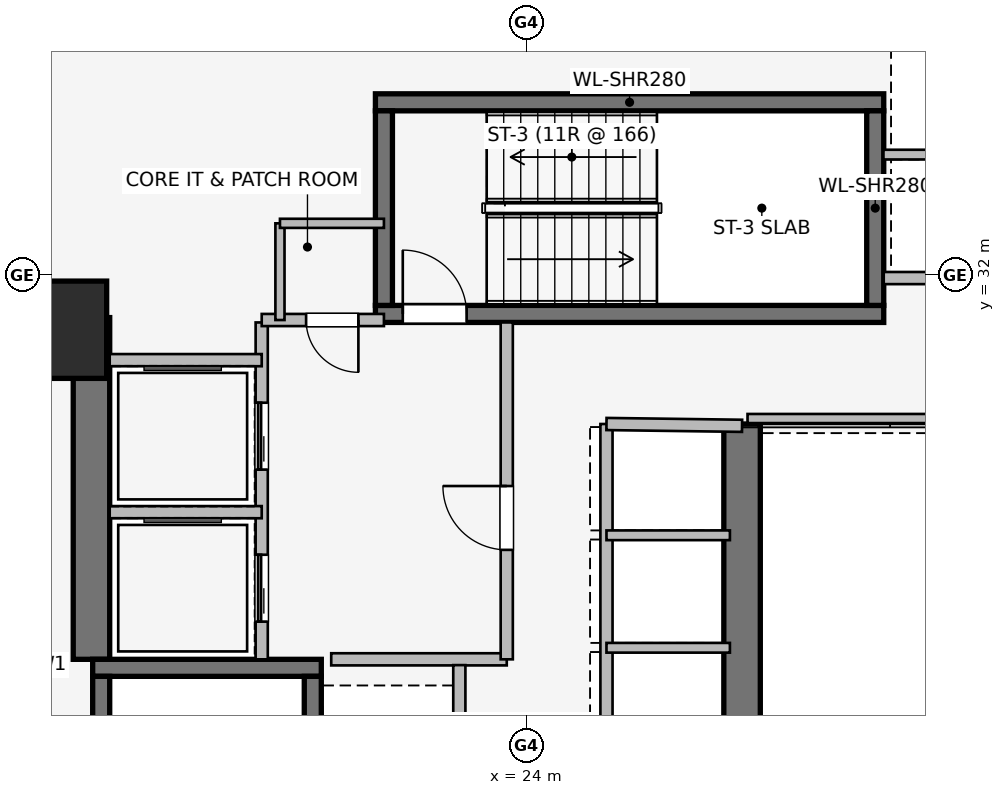
"""IFC4 building model, lengths in metres.
Left out: names, types, materials, properties, quantities, classifications, styles, units other than length and angle.
Written with IfcOpenShell. Run it as: python <this file> out.ifc"""

import sys

from ifc_helpers import new_model, si_unit, direction, frame, frame_2d, origin, origin_2d, place, context, subcontext, project, spatial, rectangle, extrude, element, fill, save


model = new_model("IFC4")
c1 = context("Model", 3, precision=1e-05, world=origin(), true_north=direction((0.0, 1.0)))
c2 = subcontext(c1, "Body", "Model", "MODEL_VIEW")
j1 = project(units=[si_unit("LENGTHUNIT", "METRE"), si_unit("PLANEANGLEUNIT", "RADIAN")], contexts=[c1])
p1 = place(None, origin())
s1 = spatial("IfcSite", under=j1, at=p1, CompositionType="ELEMENT")
p2 = place(p1, origin())
s2 = spatial("IfcBuilding", under=s1, at=p2, CompositionType="ELEMENT")
p3 = place(p2, frame((0.0, 0.0, 48.9)))
s3 = spatial("IfcBuildingStorey", under=s2, at=p3, CompositionType="ELEMENT", Elevation=48.9)
p4 = place(p3, frame((16.85, 25.68, 0.0), z_axis=(0.0, 0.0, 1.0), x_axis=(0.0, 1.0, 0.0)))
e1 = element("IfcWall", 1, at=p4, inside=s3, PredefinedType="SHEAR", context=c2, shape_type="SweptSolid", body=[
    extrude(rectangle(XDim=5.62, YDim=0.6, at=frame_2d((2.81, 0.0))), origin(), (0.0, 0.0, 1.0), 3.65),
])
p5 = place(p3, frame((27.55, 29.55, 0.0), z_axis=(0.0, 0.0, 1.0), x_axis=(0.0, -1.0, 0.0)))
e2 = element("IfcWall", 2, at=p5, inside=s3, PredefinedType="SHEAR", context=c2, shape_type="SweptSolid", body=[
    extrude(rectangle(XDim=11.25, YDim=0.6, at=frame_2d((5.625, 0.0))), origin(), (0.0, 0.0, 1.0), 3.65),
])
p6 = place(p3, frame((20.63, 25.54, 0.0), z_axis=(0.0, 0.0, 1.0), x_axis=(-1.0, 0.0, 0.0)))
e3 = element("IfcWall", 3, at=p6, inside=s3, PredefinedType="SHEAR", context=c2, shape_type="SweptSolid", body=[
    extrude(rectangle(XDim=3.76, YDim=0.28, at=frame_2d((1.88, 0.0))), origin(), (0.0, 0.0, 1.0), 3.65),
])
p7 = place(p3, frame((17.01, 25.4, 0.0), z_axis=(0.0, 0.0, 1.0), x_axis=(0.0, -1.0, 0.0)))
e4 = element("IfcWall", 4, at=p7, inside=s3, PredefinedType="SHEAR", context=c2, shape_type="SweptSolid", body=[
    extrude(rectangle(XDim=7.8, YDim=0.28, at=frame_2d((3.9, 0.0))), origin(), (0.0, 0.0, 1.0), 3.65),
])
p8 = place(p3, frame((20.49, 17.6, 0.0), z_axis=(0.0, 0.0, 1.0), x_axis=(0.0, 1.0, 0.0)))
e5 = element("IfcWall", 5, at=p8, inside=s3, PredefinedType="SHEAR", context=c2, shape_type="SweptSolid", body=[
    extrude(rectangle(XDim=7.8, YDim=0.28, at=frame_2d((3.9, 0.0))), origin(), (0.0, 0.0, 1.0), 3.65),
])
p9 = place(p8, frame((0.44, 0.0, 0.0)))
e6 = element("IfcOpeningElement", 6, at=p9, cuts=e5, PredefinedType="OPENING", context=c2, shape_type="SweptSolid", body=[
    extrude(rectangle(XDim=1.05, YDim=2.0, at=frame_2d((0.525, 1.0))), frame((0.0, 0.15, 0.0), z_axis=(0.0, -1.0, 0.0), x_axis=(1.0, 0.0, 0.0)), (0.0, 0.0, 1.0), 0.3),
])
p10 = place(p3, frame((21.52, 31.36, 0.0), z_axis=(0.0, 0.0, 1.0), x_axis=(1.0, 0.0, 0.0)))
e7 = element("IfcWall", 7, at=p10, inside=s3, PredefinedType="SHEAR", context=c2, shape_type="SweptSolid", body=[
    extrude(rectangle(XDim=8.36, YDim=0.28, at=frame_2d((4.18, 0.0))), origin(), (0.0, 0.0, 1.0), 3.65),
])
p11 = place(p10, frame((0.45, 0.0, 0.0)))
e8 = element("IfcOpeningElement", 8, at=p11, cuts=e7, PredefinedType="OPENING", context=c2, shape_type="SweptSolid", body=[
    extrude(rectangle(XDim=1.05, YDim=2.0, at=frame_2d((0.525, 1.0))), frame((0.0, 0.15, 0.0), z_axis=(0.0, -1.0, 0.0), x_axis=(1.0, 0.0, 0.0)), (0.0, 0.0, 1.0), 0.3),
])
p12 = place(p3, frame((29.88, 34.84, 0.0), z_axis=(0.0, 0.0, 1.0), x_axis=(-1.0, 0.0, 0.0)))
e9 = element("IfcWall", 9, at=p12, inside=s3, PredefinedType="SHEAR", context=c2, shape_type="SweptSolid", body=[
    extrude(rectangle(XDim=8.36, YDim=0.28, at=frame_2d((4.18, 0.0))), origin(), (0.0, 0.0, 1.0), 3.65),
])
for number, where, z_axis, x_axis in (
    (10, (21.66, 34.7, 0.0), (0.0, 0.0, 1.0), (0.0, -1.0, 0.0)),
    (11, (29.74, 31.5, 0.0), (0.0, 0.0, 1.0), (0.0, 1.0, 0.0)),
):
    element("IfcWall", number, at=place(p3, frame(where, z_axis=z_axis, x_axis=x_axis)), inside=s3, PredefinedType="SHEAR", context=c2, shape_type="SweptSolid", body=[
        extrude(rectangle(XDim=3.2, YDim=0.28, at=frame_2d((1.6, 0.0))), origin(), (0.0, 0.0, 1.0), 3.65),
    ])
p13 = place(p3, frame((16.3, 31.1, 0.0), z_axis=(0.0, 0.0, 1.0), x_axis=(1.0, 0.0, 0.0)))
e12 = element("IfcColumn", 12, at=p13, inside=s3, PredefinedType="COLUMN", context=c2, shape_type="SweptSolid", body=[
    extrude(rectangle(XDim=1.6, YDim=1.6, at=origin_2d()), origin(), (0.0, 0.0, 1.0), 3.65),
])
p14 = place(p3, frame((19.65, 25.68, 0.0), z_axis=(0.0, 0.0, 1.0), x_axis=(0.0, 1.0, 0.0)))
e13 = element("IfcWall", 13, at=p14, inside=s3, PredefinedType="PARTITIONING", context=c2, shape_type="SweptSolid", body=[
    extrude(rectangle(XDim=5.54, YDim=0.2, at=frame_2d((2.77, 0.0))), origin(), (0.0, 0.0, 1.0), 3.36),
])
p15 = place(p14, frame((0.62, 0.0, 0.0)))
e14 = element("IfcOpeningElement", 14, at=p15, cuts=e13, PredefinedType="OPENING", context=c2, shape_type="SweptSolid", body=[
    extrude(rectangle(XDim=1.1, YDim=2.2, at=frame_2d((0.55, 1.1))), frame((0.0, 0.11, 0.0), z_axis=(0.0, -1.0, 0.0), x_axis=(1.0, 0.0, 0.0)), (0.0, 0.0, 1.0), 0.22),
])
p16 = place(p14, frame((3.12, 0.0, 0.0)))
e15 = element("IfcOpeningElement", 15, at=p16, cuts=e13, PredefinedType="OPENING", context=c2, shape_type="SweptSolid", body=[
    extrude(rectangle(XDim=1.1, YDim=2.2, at=frame_2d((0.55, 1.1))), frame((0.0, 0.11, 0.0), z_axis=(0.0, -1.0, 0.0), x_axis=(1.0, 0.0, 0.0)), (0.0, 0.0, 1.0), 0.22),
])
p17 = place(p3, frame((20.793, 25.68, 0.0), z_axis=(0.0, 0.0, 1.0), x_axis=(1.0, 0.0, 0.0)))
e16 = element("IfcWall", 16, at=p17, inside=s3, PredefinedType="PARTITIONING", context=c2, shape_type="SweptSolid", body=[
    extrude(rectangle(XDim=2.887, YDim=0.2, at=frame_2d((1.443, 0.0))), origin(), (0.0, 0.0, 1.0), 3.36),
])
p18 = place(p3, frame((23.68, 25.68, 0.0), z_axis=(0.0, 0.0, 1.0), x_axis=(0.0, 1.0, 0.0)))
e17 = element("IfcWall", 17, at=p18, inside=s3, PredefinedType="PARTITIONING", context=c2, shape_type="SweptSolid", body=[
    extrude(rectangle(XDim=5.54, YDim=0.2, at=frame_2d((2.77, 0.0))), origin(), (0.0, 0.0, 1.0), 3.36),
])
p19 = place(p18, frame((1.8, 0.0, 0.0)))
e18 = element("IfcOpeningElement", 18, at=p19, cuts=e17, PredefinedType="OPENING", context=c2, shape_type="SweptSolid", body=[
    extrude(rectangle(XDim=1.05, YDim=2.0, at=frame_2d((0.525, 1.0))), frame((0.0, 0.11, 0.0), z_axis=(0.0, -1.0, 0.0), x_axis=(1.0, 0.0, 0.0)), (0.0, 0.0, 1.0), 0.22),
])
p20 = place(p3, frame((21.66, 31.26, 0.0), z_axis=(0.0, 0.0, 1.0), x_axis=(-1.0, 0.0, 0.0)))
e19 = element("IfcWall", 19, at=p20, inside=s3, PredefinedType="PARTITIONING", context=c2, shape_type="SweptSolid", body=[
    extrude(rectangle(XDim=2.01, YDim=0.2, at=frame_2d((1.005, 0.0))), origin(), (0.0, 0.0, 1.0), 3.36),
])
p21 = place(p20, frame((0.42, 0.0, 0.0)))
e20 = element("IfcOpeningElement", 20, at=p21, cuts=e19, PredefinedType="OPENING", context=c2, shape_type="SweptSolid", body=[
    extrude(rectangle(XDim=0.86, YDim=2.0, at=frame_2d((0.43, 1.0))), frame((0.0, 0.11, 0.0), z_axis=(0.0, -1.0, 0.0), x_axis=(1.0, 0.0, 0.0)), (0.0, 0.0, 1.0), 0.22),
])
p22 = place(p3, frame((17.15, 28.1, 0.0), z_axis=(0.0, 0.0, 1.0), x_axis=(1.0, 0.0, 0.0)))
e21 = element("IfcWall", 21, at=p22, inside=s3, PredefinedType="PARTITIONING", context=c2, shape_type="SweptSolid", body=[
    extrude(rectangle(XDim=2.5, YDim=0.2, at=frame_2d((1.25, 0.0))), origin(), (0.0, 0.0, 1.0), 3.36),
])
p23 = place(p3, frame((19.65, 30.6, 0.0), z_axis=(0.0, 0.0, 1.0), x_axis=(-1.0, 0.0, 0.0)))
e22 = element("IfcWall", 22, at=p23, inside=s3, PredefinedType="PARTITIONING", context=c2, shape_type="SweptSolid", body=[
    extrude(rectangle(XDim=2.5, YDim=0.2, at=frame_2d((1.25, 0.0))), origin(), (0.0, 0.0, 1.0), 2.26),
])
p24 = place(p3, frame((32.48, 31.95, 0.0), z_axis=(0.0, 0.0, 1.0), x_axis=(-1.0, 0.0, 0.0)))
e23 = element("IfcWall", 23, at=p24, inside=s3, PredefinedType="PARTITIONING", context=c2, shape_type="SweptSolid", body=[
    extrude(rectangle(XDim=2.6, YDim=0.2, at=frame_2d((1.3, 0.0))), origin(), (0.0, 0.0, 1.0), 3.36),
])
p25 = place(p3, frame((29.875, 33.98, 0.0), z_axis=(0.0, 0.0, 1.0), x_axis=(1.0, 0.0, 0.0)))
e24 = element("IfcWall", 24, at=p25, inside=s3, PredefinedType="PARTITIONING", context=c2, shape_type="SweptSolid", body=[
    extrude(rectangle(XDim=2.605, YDim=0.16, at=frame_2d((1.302, 0.0))), origin(), (0.0, 0.0, 1.0), 3.36),
])
p26 = place(p3, frame((22.9, 19.5, 0.0), z_axis=(0.0, 0.0, 1.0), x_axis=(0.0, 1.0, 0.0)))
e25 = element("IfcWall", 25, at=p26, inside=s3, PredefinedType="PARTITIONING", context=c2, shape_type="SweptSolid", body=[
    extrude(rectangle(XDim=6.085, YDim=0.2, at=frame_2d((3.042, 0.0))), origin(), (0.0, 0.0, 1.0), 3.36),
])
p27 = place(p3, frame((25.32, 29.55, 0.0), z_axis=(0.0, 0.0, 1.0), x_axis=(0.0, -1.0, 0.0)))
e26 = element("IfcWall", 26, at=p27, inside=s3, PredefinedType="PARTITIONING", context=c2, shape_type="SweptSolid", body=[
    extrude(rectangle(XDim=11.19, YDim=0.2, at=frame_2d((5.595, 0.0))), origin(), (0.0, 0.0, 1.0), 3.36),
])
p28 = place(p27, frame((6.22, 0.0, 0.0)))
e27 = element("IfcOpeningElement", 27, at=p28, cuts=e26, PredefinedType="OPENING", context=c2, shape_type="SweptSolid", body=[
    extrude(rectangle(XDim=1.1, YDim=2.2, at=frame_2d((0.55, 1.1))), frame((0.0, 0.11, 0.0), z_axis=(0.0, -1.0, 0.0), x_axis=(1.0, 0.0, 0.0)), (0.0, 0.0, 1.0), 0.22),
])
p29 = place(p27, frame((8.07, 0.0, 0.0)))
e28 = element("IfcOpeningElement", 28, at=p29, cuts=e26, PredefinedType="OPENING", context=c2, shape_type="SweptSolid", body=[
    extrude(rectangle(XDim=1.1, YDim=2.2, at=frame_2d((0.55, 1.1))), frame((0.0, 0.11, 0.0), z_axis=(0.0, -1.0, 0.0), x_axis=(1.0, 0.0, 0.0)), (0.0, 0.0, 1.0), 0.22),
])
p30 = place(p27, frame((9.73, 0.0, 0.0)))
e29 = element("IfcOpeningElement", 29, at=p30, cuts=e26, PredefinedType="OPENING", context=c2, shape_type="SweptSolid", body=[
    extrude(rectangle(XDim=1.1, YDim=2.2, at=frame_2d((0.55, 1.1))), frame((0.0, 0.11, 0.0), z_axis=(0.0, -1.0, 0.0), x_axis=(1.0, 0.0, 0.0)), (0.0, 0.0, 1.0), 0.22),
])
p31 = place(p3, frame((27.55, 29.52, 0.0), z_axis=(0.0, 0.0, 1.0), x_axis=(-0.999909343457, 0.013464949556, 0.0)))
e30 = element("IfcWall", 30, at=p31, inside=s3, PredefinedType="PARTITIONING", context=c2, shape_type="SweptSolid", body=[
    extrude(rectangle(XDim=2.23, YDim=0.2, at=frame_2d((1.115, 0.0))), origin(), (0.0, 0.0, 1.0), 2.26),
])
for number, where, z_axis, x_axis in (
    (31, (25.32, 25.87, 0.0), (0.0, 0.0, 1.0), (1.0, 0.0, 0.0)),
    (32, (25.32, 27.72, 0.0), (0.0, 0.0, 1.0), (1.0, 0.0, 0.0)),
):
    element("IfcWall", number, at=place(p3, frame(where, z_axis=z_axis, x_axis=x_axis)), inside=s3, PredefinedType="PARTITIONING", context=c2, shape_type="SweptSolid", body=[
        extrude(rectangle(XDim=2.03, YDim=0.16, at=frame_2d((1.015, 0.0))), origin(), (0.0, 0.0, 1.0), 3.36),
    ])
p32 = place(p3, frame((19.95, 32.85, 0.0), z_axis=(0.0, 0.0, 1.0), x_axis=(0.0, -1.0, 0.0)))
e33 = element("IfcWall", 33, at=p32, inside=s3, PredefinedType="PARTITIONING", context=c2, shape_type="SweptSolid", body=[
    extrude(rectangle(XDim=1.59, YDim=0.15, at=frame_2d((0.795, 0.0))), origin(), (0.0, 0.0, 1.0), 3.36),
])
p33 = place(p3, frame((21.66, 32.85, 0.0), z_axis=(0.0, 0.0, 1.0), x_axis=(-1.0, 0.0, 0.0)))
e34 = element("IfcWall", 34, at=p33, inside=s3, PredefinedType="PARTITIONING", context=c2, shape_type="SweptSolid", body=[
    extrude(rectangle(XDim=1.71, YDim=0.15, at=frame_2d((0.855, 0.0))), origin(), (0.0, 0.0, 1.0), 3.36),
])
p34 = place(p3, frame((39.84, 29.64, 0.0), z_axis=(0.0, 0.0, 1.0), x_axis=(-1.0, 0.0, 0.0)))
e35 = element("IfcWall", 35, at=p34, inside=s3, PredefinedType="PARTITIONING", context=c2, shape_type="SweptSolid", body=[
    extrude(rectangle(XDim=12.2, YDim=0.15, at=frame_2d((6.1, 0.0))), origin(), (0.0, 0.0, 1.0), 2.501),
])
p35 = place(p11, origin())
e36 = element("IfcDoor", 36, at=p35, inside=s3, OperationType="SINGLE_SWING_LEFT", PredefinedType="DOOR", context=c2, shape_type="SweptSolid", body=[
    extrude(rectangle(XDim=1.05, YDim=2.0, at=frame_2d((0.525, 1.0))), frame((0.0, 0.025, 0.0), z_axis=(0.0, -1.0, 0.0), x_axis=(1.0, 0.0, 0.0)), (0.0, 0.0, 1.0), 0.05),
])
fill(e8, e36)
p36 = place(p15, origin())
e37 = element("IfcDoor", 37, at=p36, inside=s3, OperationType="SLIDING_TO_LEFT", PredefinedType="DOOR", context=c2, shape_type="SweptSolid", body=[
    extrude(rectangle(XDim=1.1, YDim=2.2, at=frame_2d((0.55, 1.1))), frame((0.0, 0.025, 0.0), z_axis=(0.0, -1.0, 0.0), x_axis=(1.0, 0.0, 0.0)), (0.0, 0.0, 1.0), 0.05),
])
fill(e14, e37)
p37 = place(p16, origin())
e38 = element("IfcDoor", 38, at=p37, inside=s3, OperationType="SLIDING_TO_LEFT", PredefinedType="DOOR", context=c2, shape_type="SweptSolid", body=[
    extrude(rectangle(XDim=1.1, YDim=2.2, at=frame_2d((0.55, 1.1))), frame((0.0, 0.025, 0.0), z_axis=(0.0, -1.0, 0.0), x_axis=(1.0, 0.0, 0.0)), (0.0, 0.0, 1.0), 0.05),
])
fill(e15, e38)
p38 = place(p19, origin())
e39 = element("IfcDoor", 39, at=p38, inside=s3, OperationType="SINGLE_SWING_RIGHT", PredefinedType="DOOR", context=c2, shape_type="SweptSolid", body=[
    extrude(rectangle(XDim=1.05, YDim=2.0, at=frame_2d((0.525, 1.0))), frame((0.0, 0.025, 0.0), z_axis=(0.0, -1.0, 0.0), x_axis=(1.0, 0.0, 0.0)), (0.0, 0.0, 1.0), 0.05),
])
fill(e18, e39)
p39 = place(p21, origin())
e40 = element("IfcDoor", 40, at=p39, inside=s3, OperationType="SINGLE_SWING_LEFT", PredefinedType="DOOR", context=c2, shape_type="SweptSolid", body=[
    extrude(rectangle(XDim=0.86, YDim=2.0, at=frame_2d((0.43, 1.0))), frame((0.0, 0.025, 0.0), z_axis=(0.0, -1.0, 0.0), x_axis=(1.0, 0.0, 0.0)), (0.0, 0.0, 1.0), 0.05),
])
fill(e20, e40)
save(model, sys.argv[1])
